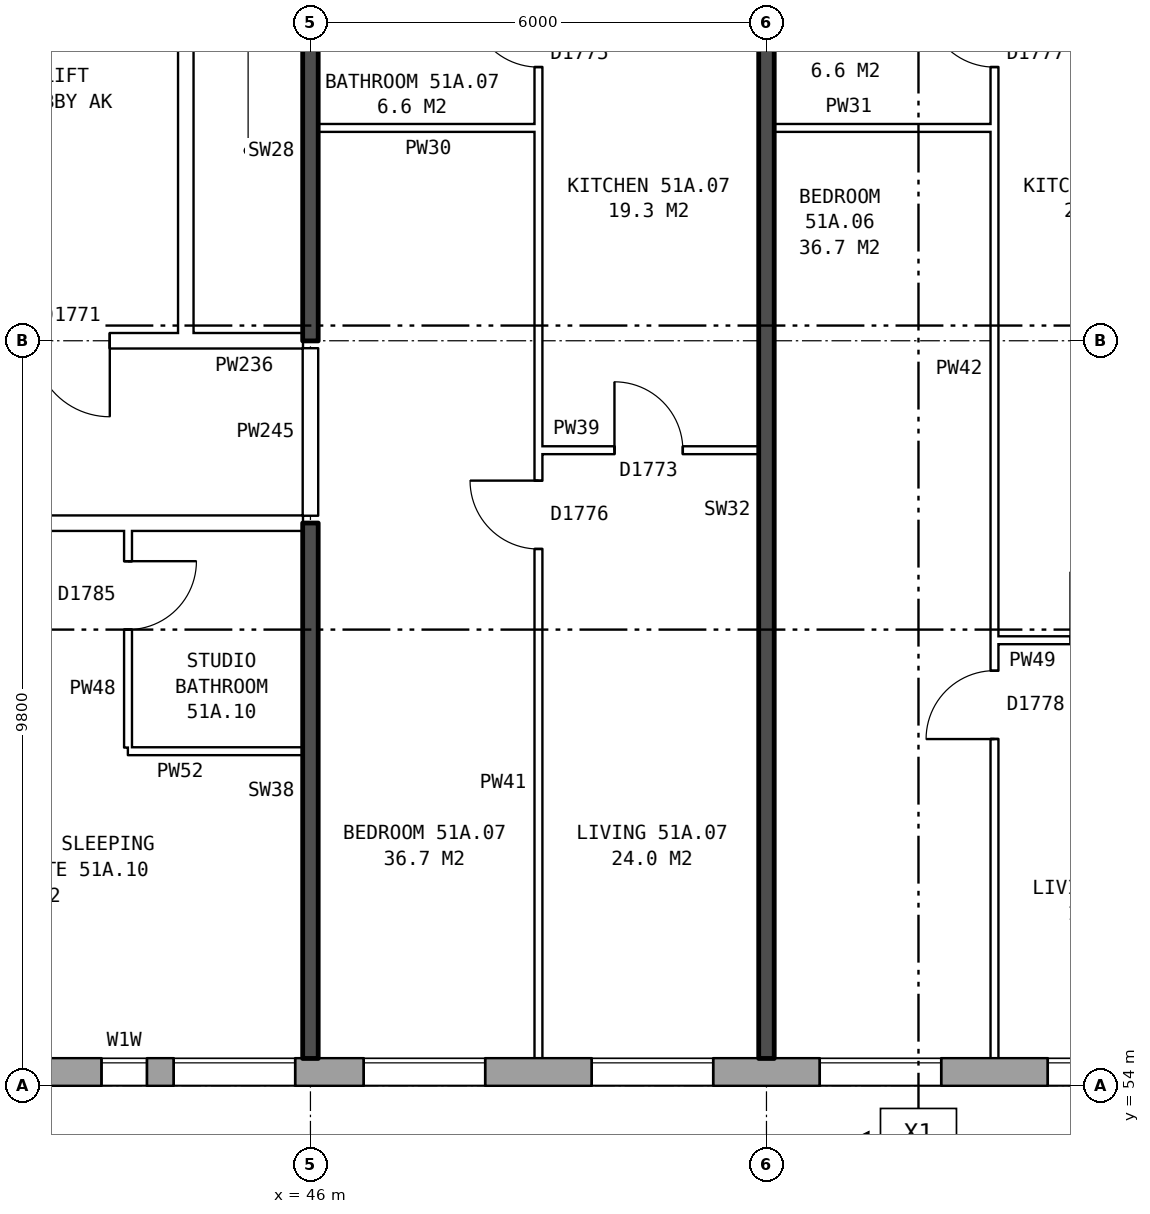
"""IFC4 building model, lengths in metres.
Left out: names, types, materials, properties, quantities, classifications, styles, units other than length and angle.
Written with IfcOpenShell. Run it as: python <this file> out.ifc"""

import sys

from ifc_helpers import new_model, si_unit, direction, frame, frame_2d, origin, place, context, subcontext, project, spatial, rectangle, extrude, element, fill, save


model = new_model("IFC4")
c1 = context("Model", 3, precision=1e-05, world=origin(), true_north=direction((0.0, 1.0)))
c2 = subcontext(c1, "Body", "Model", "MODEL_VIEW")
j1 = project(units=[si_unit("LENGTHUNIT", "METRE"), si_unit("PLANEANGLEUNIT", "RADIAN")], contexts=[c1])
p1 = place(None, origin())
s1 = spatial("IfcSite", under=j1, at=p1, CompositionType="ELEMENT")
p2 = place(p1, origin())
s2 = spatial("IfcBuilding", under=s1, at=p2, CompositionType="ELEMENT")
p3 = place(p2, frame((0.0, 0.0, 182.0)))
s3 = spatial("IfcBuildingStorey", under=s2, at=p3, CompositionType="ELEMENT", Elevation=182.0)
p4 = place(p3, frame((33.325, 54.18, 0.0), z_axis=(0.0, 0.0, 1.0), x_axis=(1.0, 0.0, 0.0)))
e1 = element("IfcWall", 1, at=p4, inside=s3, PredefinedType="STANDARD", context=c2, shape_type="SweptSolid", body=[
    extrude(rectangle(XDim=39.601, YDim=0.36, at=frame_2d((19.8, 0.0))), origin(), (0.0, 0.0, 1.0), 2.85),
])
p5 = place(p4, frame((1.375, 0.0, 0.8)))
e2 = element("IfcOpeningElement", 2, at=p5, cuts=e1, PredefinedType="OPENING", context=c2, shape_type="SweptSolid", body=[
    extrude(rectangle(XDim=1.6, YDim=1.8, at=frame_2d((0.8, 0.9))), frame((0.0, 0.19, 0.0), z_axis=(0.0, -1.0, 0.0), x_axis=(1.0, 0.0, 0.0)), (0.0, 0.0, 1.0), 0.38),
])
p6 = place(p4, frame((4.375, 0.0, 0.8)))
e3 = element("IfcOpeningElement", 3, at=p6, cuts=e1, PredefinedType="OPENING", context=c2, shape_type="SweptSolid", body=[
    extrude(rectangle(XDim=1.6, YDim=1.8, at=frame_2d((0.8, 0.9))), frame((0.0, 0.19, 0.0), z_axis=(0.0, -1.0, 0.0), x_axis=(1.0, 0.0, 0.0)), (0.0, 0.0, 1.0), 0.38),
])
p7 = place(p4, frame((6.875, 0.0, 0.8)))
e4 = element("IfcOpeningElement", 4, at=p7, cuts=e1, PredefinedType="OPENING", context=c2, shape_type="SweptSolid", body=[
    extrude(rectangle(XDim=1.0, YDim=1.8, at=frame_2d((0.5, 0.9))), frame((0.0, 0.19, 0.0), z_axis=(0.0, -1.0, 0.0), x_axis=(1.0, 0.0, 0.0)), (0.0, 0.0, 1.0), 0.38),
])
p8 = place(p4, frame((8.175, 0.0, 1.7)))
e5 = element("IfcOpeningElement", 5, at=p8, cuts=e1, PredefinedType="OPENING", context=c2, shape_type="SweptSolid", body=[
    extrude(rectangle(XDim=0.6, YDim=0.9, at=frame_2d((0.3, 0.45))), frame((0.0, 0.19, 0.0), z_axis=(0.0, -1.0, 0.0), x_axis=(1.0, 0.0, 0.0)), (0.0, 0.0, 1.0), 0.38),
])
p9 = place(p4, frame((13.375, 0.0, 0.8)))
e6 = element("IfcOpeningElement", 6, at=p9, cuts=e1, PredefinedType="OPENING", context=c2, shape_type="SweptSolid", body=[
    extrude(rectangle(XDim=1.6, YDim=1.8, at=frame_2d((0.8, 0.9))), frame((0.0, 0.19, 0.0), z_axis=(0.0, -1.0, 0.0), x_axis=(1.0, 0.0, 0.0)), (0.0, 0.0, 1.0), 0.38),
])
p10 = place(p4, frame((16.375, 0.0, 0.8)))
e7 = element("IfcOpeningElement", 7, at=p10, cuts=e1, PredefinedType="OPENING", context=c2, shape_type="SweptSolid", body=[
    extrude(rectangle(XDim=1.6, YDim=1.8, at=frame_2d((0.8, 0.9))), frame((0.0, 0.19, 0.0), z_axis=(0.0, -1.0, 0.0), x_axis=(1.0, 0.0, 0.0)), (0.0, 0.0, 1.0), 0.38),
])
p11 = place(p4, frame((19.375, 0.0, 0.8)))
e8 = element("IfcOpeningElement", 8, at=p11, cuts=e1, PredefinedType="OPENING", context=c2, shape_type="SweptSolid", body=[
    extrude(rectangle(XDim=1.6, YDim=1.8, at=frame_2d((0.8, 0.9))), frame((0.0, 0.19, 0.0), z_axis=(0.0, -1.0, 0.0), x_axis=(1.0, 0.0, 0.0)), (0.0, 0.0, 1.0), 0.38),
])
p12 = place(p4, frame((22.375, 0.0, 0.8)))
e9 = element("IfcOpeningElement", 9, at=p12, cuts=e1, PredefinedType="OPENING", context=c2, shape_type="SweptSolid", body=[
    extrude(rectangle(XDim=1.6, YDim=1.8, at=frame_2d((0.8, 0.9))), frame((0.0, 0.19, 0.0), z_axis=(0.0, -1.0, 0.0), x_axis=(1.0, 0.0, 0.0)), (0.0, 0.0, 1.0), 0.38),
])
p13 = place(p4, frame((25.375, 0.0, 0.8)))
e10 = element("IfcOpeningElement", 10, at=p13, cuts=e1, PredefinedType="OPENING", context=c2, shape_type="SweptSolid", body=[
    extrude(rectangle(XDim=1.6, YDim=1.8, at=frame_2d((0.8, 0.9))), frame((0.0, 0.19, 0.0), z_axis=(0.0, -1.0, 0.0), x_axis=(1.0, 0.0, 0.0)), (0.0, 0.0, 1.0), 0.38),
])
p14 = place(p4, frame((27.825, 0.0, 0.35)))
e11 = element("IfcOpeningElement", 11, at=p14, cuts=e1, PredefinedType="OPENING", context=c2, shape_type="SweptSolid", body=[
    extrude(rectangle(XDim=1.4, YDim=1.8, at=frame_2d((0.7, 0.9))), frame((0.0, 0.19, 0.0), z_axis=(0.0, -1.0, 0.0), x_axis=(1.0, 0.0, 0.0)), (0.0, 0.0, 1.0), 0.38),
])
p15 = place(p4, frame((31.375, 0.0, 0.8)))
e12 = element("IfcOpeningElement", 12, at=p15, cuts=e1, PredefinedType="OPENING", context=c2, shape_type="SweptSolid", body=[
    extrude(rectangle(XDim=1.6, YDim=1.8, at=frame_2d((0.8, 0.9))), frame((0.0, 0.19, 0.0), z_axis=(0.0, -1.0, 0.0), x_axis=(1.0, 0.0, 0.0)), (0.0, 0.0, 1.0), 0.38),
])
p16 = place(p4, frame((34.375, 0.0, 0.8)))
e13 = element("IfcOpeningElement", 13, at=p16, cuts=e1, PredefinedType="OPENING", context=c2, shape_type="SweptSolid", body=[
    extrude(rectangle(XDim=1.6, YDim=1.8, at=frame_2d((0.8, 0.9))), frame((0.0, 0.19, 0.0), z_axis=(0.0, -1.0, 0.0), x_axis=(1.0, 0.0, 0.0)), (0.0, 0.0, 1.0), 0.38),
])
p17 = place(p4, frame((37.375, 0.0, 0.8)))
e14 = element("IfcOpeningElement", 14, at=p17, cuts=e1, PredefinedType="OPENING", context=c2, shape_type="SweptSolid", body=[
    extrude(rectangle(XDim=1.6, YDim=1.8, at=frame_2d((0.8, 0.9))), frame((0.0, 0.19, 0.0), z_axis=(0.0, -1.0, 0.0), x_axis=(1.0, 0.0, 0.0)), (0.0, 0.0, 1.0), 0.38),
])
p18 = place(p4, frame((9.925, 0.0, 0.8)))
e15 = element("IfcOpeningElement", 15, at=p18, cuts=e1, PredefinedType="OPENING", context=c2, shape_type="SweptSolid", body=[
    extrude(rectangle(XDim=0.6, YDim=0.9, at=frame_2d((0.3, 0.45))), frame((0.0, 0.19, 0.0), z_axis=(0.0, -1.0, 0.0), x_axis=(1.0, 0.0, 0.0)), (0.0, 0.0, 1.0), 0.38),
])
p19 = place(p4, frame((10.875, 0.0, 0.8)))
e16 = element("IfcOpeningElement", 16, at=p19, cuts=e1, PredefinedType="OPENING", context=c2, shape_type="SweptSolid", body=[
    extrude(rectangle(XDim=1.6, YDim=1.8, at=frame_2d((0.8, 0.9))), frame((0.0, 0.19, 0.0), z_axis=(0.0, -1.0, 0.0), x_axis=(1.0, 0.0, 0.0)), (0.0, 0.0, 1.0), 0.38),
])
p20 = place(p4, frame((29.525, 0.0, 0.35)))
e17 = element("IfcOpeningElement", 17, at=p20, cuts=e1, PredefinedType="OPENING", context=c2, shape_type="SweptSolid", body=[
    extrude(rectangle(XDim=0.6, YDim=0.9, at=frame_2d((0.3, 0.45))), frame((0.0, 0.19, 0.0), z_axis=(0.0, -1.0, 0.0), x_axis=(1.0, 0.0, 0.0)), (0.0, 0.0, 1.0), 0.38),
])
p21 = place(p3, frame((44.36, 63.9, 0.0), z_axis=(0.0, 0.0, 1.0), x_axis=(0.0, 1.0, 0.0)))
e18 = element("IfcWall", 18, at=p21, inside=s3, PredefinedType="PARTITIONING", context=c2, shape_type="SweptSolid", body=[
    extrude(rectangle(XDim=12.2, YDim=0.2, at=frame_2d((6.1, 0.0))), origin(), (0.0, 0.0, 1.0), 2.85),
])
p22 = place(p21, frame((5.1, 0.0, 0.0)))
e19 = element("IfcOpeningElement", 19, at=p22, cuts=e18, PredefinedType="OPENING", context=c2, shape_type="SweptSolid", body=[
    extrude(rectangle(XDim=2.0, YDim=2.1, at=frame_2d((1.0, 1.05))), frame((0.0, 0.11, 0.0), z_axis=(0.0, -1.0, 0.0), x_axis=(1.0, 0.0, 0.0)), (0.0, 0.0, 1.0), 0.22),
])
p23 = place(p3, frame((43.6, 58.4, 0.0), z_axis=(0.0, 0.0, 1.0), x_axis=(1.0, 0.0, 0.0)))
e20 = element("IfcWall", 20, at=p23, inside=s3, PredefinedType="PARTITIONING", context=c2, shape_type="SweptSolid", body=[
    extrude(rectangle(XDim=2.3, YDim=0.1, at=frame_2d((1.15, 0.0))), origin(), (0.0, 0.0, 1.0), 2.85),
])
p24 = place(p3, frame((55.0, 59.86, 0.0), z_axis=(0.0, 0.0, 1.0), x_axis=(1.0, 0.0, 0.0)))
e21 = element("IfcWall", 21, at=p24, inside=s3, PredefinedType="PARTITIONING", context=c2, shape_type="SweptSolid", body=[
    extrude(rectangle(XDim=2.9, YDim=0.1, at=frame_2d((1.45, 0.0))), origin(), (0.0, 0.0, 1.0), 2.85),
])
p25 = place(p24, frame((1.0, 0.0, 0.0)))
e22 = element("IfcOpeningElement", 22, at=p25, cuts=e21, PredefinedType="OPENING", context=c2, shape_type="SweptSolid", body=[
    extrude(rectangle(XDim=0.9, YDim=2.1, at=frame_2d((0.45, 1.05))), frame((0.0, 0.06, 0.0), z_axis=(0.0, -1.0, 0.0), x_axis=(1.0, 0.0, 0.0)), (0.0, 0.0, 1.0), 0.12),
])
p26 = place(p3, frame((30.61, 61.4, 0.0), z_axis=(0.0, 0.0, 1.0), x_axis=(1.0, 0.0, 0.0)))
e23 = element("IfcWall", 23, at=p26, inside=s3, PredefinedType="PARTITIONING", context=c2, shape_type="SweptSolid", body=[
    extrude(rectangle(XDim=15.29, YDim=0.2, at=frame_2d((7.645, 0.0))), origin(), (0.0, 0.0, 1.0), 2.85),
])
p27 = place(p26, frame((10.69, 0.0, 0.0)))
e24 = element("IfcOpeningElement", 24, at=p27, cuts=e23, PredefinedType="OPENING", context=c2, shape_type="SweptSolid", body=[
    extrude(rectangle(XDim=1.0, YDim=2.1, at=frame_2d((0.5, 1.05))), frame((0.0, 0.11, 0.0), z_axis=(0.0, -1.0, 0.0), x_axis=(1.0, 0.0, 0.0)), (0.0, 0.0, 1.0), 0.22),
])
p28 = place(p26, frame((5.89, 0.0, 0.0)))
e25 = element("IfcOpeningElement", 25, at=p28, cuts=e23, PredefinedType="OPENING", context=c2, shape_type="SweptSolid", body=[
    extrude(rectangle(XDim=1.0, YDim=2.1, at=frame_2d((0.5, 1.05))), frame((0.0, 0.11, 0.0), z_axis=(0.0, -1.0, 0.0), x_axis=(1.0, 0.0, 0.0)), (0.0, 0.0, 1.0), 0.22),
])
p29 = place(p3, frame((49.0, 62.36, 0.0), z_axis=(0.0, 0.0, 1.0), x_axis=(1.0, 0.0, 0.0)))
e26 = element("IfcWall", 26, at=p29, inside=s3, PredefinedType="PARTITIONING", context=c2, shape_type="SweptSolid", body=[
    extrude(rectangle(XDim=2.9, YDim=0.1, at=frame_2d((1.45, 0.0))), origin(), (0.0, 0.0, 1.0), 2.85),
])
p30 = place(p29, frame((1.0, 0.0, 0.0)))
e27 = element("IfcOpeningElement", 27, at=p30, cuts=e26, PredefinedType="OPENING", context=c2, shape_type="SweptSolid", body=[
    extrude(rectangle(XDim=0.9, YDim=2.1, at=frame_2d((0.45, 1.05))), frame((0.0, 0.06, 0.0), z_axis=(0.0, -1.0, 0.0), x_axis=(1.0, 0.0, 0.0)), (0.0, 0.0, 1.0), 0.12),
])
p31 = place(p3, frame((41.36, 63.8, 0.0), z_axis=(0.0, 0.0, 1.0), x_axis=(1.0, 0.0, 0.0)))
e28 = element("IfcWall", 28, at=p31, inside=s3, PredefinedType="PARTITIONING", context=c2, shape_type="SweptSolid", body=[
    extrude(rectangle(XDim=3.0, YDim=0.2, at=frame_2d((1.5, 0.0))), origin(), (0.0, 0.0, 1.0), 2.85),
])
p32 = place(p31, frame((1.0, 0.0, 0.0)))
e29 = element("IfcOpeningElement", 29, at=p32, cuts=e28, PredefinedType="OPENING", context=c2, shape_type="SweptSolid", body=[
    extrude(rectangle(XDim=1.0, YDim=2.1, at=frame_2d((0.5, 1.05))), frame((0.0, 0.11, 0.0), z_axis=(0.0, -1.0, 0.0), x_axis=(1.0, 0.0, 0.0)), (0.0, 0.0, 1.0), 0.22),
])
p33 = place(p3, frame((44.36, 63.8, 0.0), z_axis=(0.0, 0.0, 1.0), x_axis=(1.0, 0.0, 0.0)))
e30 = element("IfcWall", 30, at=p33, inside=s3, PredefinedType="PARTITIONING", context=c2, shape_type="SweptSolid", body=[
    extrude(rectangle(XDim=1.54, YDim=0.2, at=frame_2d((0.77, 0.0))), origin(), (0.0, 0.0, 1.0), 2.85),
])
for number, where, z_axis, x_axis in (
    (31, (46.1, 66.6, 0.0), (0.0, 0.0, 1.0), (1.0, 0.0, 0.0)),
    (32, (52.1, 66.6, 0.0), (0.0, 0.0, 1.0), (1.0, 0.0, 0.0)),
):
    element("IfcWall", number, at=place(p3, frame(where, z_axis=z_axis, x_axis=x_axis)), inside=s3, PredefinedType="PARTITIONING", context=c2, shape_type="SweptSolid", body=[
        extrude(rectangle(XDim=2.9, YDim=0.1, at=frame_2d((1.45, 0.0))), origin(), (0.0, 0.0, 1.0), 2.85),
    ])
p34 = place(p3, frame((43.6, 58.45, 0.0), z_axis=(0.0, 0.0, 1.0), x_axis=(0.0, 1.0, 0.0)))
e33 = element("IfcWall", 33, at=p34, inside=s3, PredefinedType="PARTITIONING", context=c2, shape_type="SweptSolid", body=[
    extrude(rectangle(XDim=2.85, YDim=0.1, at=frame_2d((1.425, 0.0))), origin(), (0.0, 0.0, 1.0), 2.85),
])
p35 = place(p34, frame((1.55, 0.0, 0.0)))
e34 = element("IfcOpeningElement", 34, at=p35, cuts=e33, PredefinedType="OPENING", context=c2, shape_type="SweptSolid", body=[
    extrude(rectangle(XDim=0.9, YDim=2.1, at=frame_2d((0.45, 1.05))), frame((0.0, 0.06, 0.0), z_axis=(0.0, -1.0, 0.0), x_axis=(1.0, 0.0, 0.0)), (0.0, 0.0, 1.0), 0.12),
])
p36 = place(p3, frame((46.0, 54.36, 0.0), z_axis=(0.0, 0.0, 1.0), x_axis=(0.0, 1.0, 0.0)))
e35 = element("IfcWall", 35, at=p36, inside=s3, PredefinedType="SOLIDWALL", context=c2, shape_type="SweptSolid", body=[
    extrude(rectangle(XDim=7.04, YDim=0.2, at=frame_2d((3.52, 0.0))), origin(), (0.0, 0.0, 1.0), 2.85),
])
p37 = place(p3, frame((46.0, 61.5, 0.0), z_axis=(0.0, 0.0, 1.0), x_axis=(0.0, 1.0, 0.0)))
e36 = element("IfcWall", 36, at=p37, inside=s3, PredefinedType="PARTITIONING", context=c2, shape_type="SweptSolid", body=[
    extrude(rectangle(XDim=2.2, YDim=0.2, at=frame_2d((1.1, 0.0))), origin(), (0.0, 0.0, 1.0), 2.85),
])
p38 = place(p3, frame((46.0, 63.8, 0.0), z_axis=(0.0, 0.0, 1.0), x_axis=(0.0, 1.0, 0.0)))
e37 = element("IfcWall", 37, at=p38, inside=s3, PredefinedType="SOLIDWALL", context=c2, shape_type="SweptSolid", body=[
    extrude(rectangle(XDim=5.0, YDim=0.2, at=frame_2d((2.5, 0.0))), origin(), (0.0, 0.0, 1.0), 2.85),
])
p39 = place(p3, frame((49.0, 54.36, 0.0), z_axis=(0.0, 0.0, 1.0), x_axis=(0.0, 1.0, 0.0)))
e38 = element("IfcWall", 38, at=p39, inside=s3, PredefinedType="PARTITIONING", context=c2, shape_type="SweptSolid", body=[
    extrude(rectangle(XDim=14.34, YDim=0.1, at=frame_2d((7.17, 0.0))), origin(), (0.0, 0.0, 1.0), 2.85),
])
p40 = place(p39, frame((6.7, 0.0, 0.0)))
e39 = element("IfcOpeningElement", 39, at=p40, cuts=e38, PredefinedType="OPENING", context=c2, shape_type="SweptSolid", body=[
    extrude(rectangle(XDim=0.9, YDim=2.1, at=frame_2d((0.45, 1.05))), frame((0.0, 0.06, 0.0), z_axis=(0.0, -1.0, 0.0), x_axis=(1.0, 0.0, 0.0)), (0.0, 0.0, 1.0), 0.12),
])
p41 = place(p39, frame((13.04, 0.0, 0.0)))
e40 = element("IfcOpeningElement", 40, at=p41, cuts=e38, PredefinedType="OPENING", context=c2, shape_type="SweptSolid", body=[
    extrude(rectangle(XDim=0.9, YDim=2.1, at=frame_2d((0.45, 1.05))), frame((0.0, 0.06, 0.0), z_axis=(0.0, -1.0, 0.0), x_axis=(1.0, 0.0, 0.0)), (0.0, 0.0, 1.0), 0.12),
])
p42 = place(p3, frame((52.0, 54.36, 0.0), z_axis=(0.0, 0.0, 1.0), x_axis=(0.0, 1.0, 0.0)))
e41 = element("IfcWall", 41, at=p42, inside=s3, PredefinedType="SOLIDWALL", context=c2, shape_type="SweptSolid", body=[
    extrude(rectangle(XDim=14.44, YDim=0.2, at=frame_2d((7.22, 0.0))), origin(), (0.0, 0.0, 1.0), 2.85),
])
p43 = place(p3, frame((55.0, 54.36, 0.0), z_axis=(0.0, 0.0, 1.0), x_axis=(0.0, 1.0, 0.0)))
e42 = element("IfcWall", 42, at=p43, inside=s3, PredefinedType="PARTITIONING", context=c2, shape_type="SweptSolid", body=[
    extrude(rectangle(XDim=14.34, YDim=0.1, at=frame_2d((7.17, 0.0))), origin(), (0.0, 0.0, 1.0), 2.85),
])
p44 = place(p43, frame((4.2, 0.0, 0.0)))
e43 = element("IfcOpeningElement", 43, at=p44, cuts=e42, PredefinedType="OPENING", context=c2, shape_type="SweptSolid", body=[
    extrude(rectangle(XDim=0.9, YDim=2.1, at=frame_2d((0.45, 1.05))), frame((0.0, 0.06, 0.0), z_axis=(0.0, -1.0, 0.0), x_axis=(1.0, 0.0, 0.0)), (0.0, 0.0, 1.0), 0.12),
])
p45 = place(p43, frame((13.04, 0.0, 0.0)))
e44 = element("IfcOpeningElement", 44, at=p45, cuts=e42, PredefinedType="OPENING", context=c2, shape_type="SweptSolid", body=[
    extrude(rectangle(XDim=0.9, YDim=2.1, at=frame_2d((0.45, 1.05))), frame((0.0, 0.06, 0.0), z_axis=(0.0, -1.0, 0.0), x_axis=(1.0, 0.0, 0.0)), (0.0, 0.0, 1.0), 0.12),
])
p46 = place(p9, origin())
e45 = element("IfcWindow", 45, at=p46, inside=s3, PartitioningType="SINGLE_PANEL", PredefinedType="WINDOW", context=c2, shape_type="SweptSolid", body=[
    extrude(rectangle(XDim=1.6, YDim=1.8, at=frame_2d((0.8, 0.9))), frame((0.0, 0.15, 0.0), z_axis=(0.0, -1.0, 0.0), x_axis=(1.0, 0.0, 0.0)), (0.0, 0.0, 1.0), 0.06),
])
fill(e6, e45)
p47 = place(p10, origin())
e46 = element("IfcWindow", 46, at=p47, inside=s3, PartitioningType="SINGLE_PANEL", PredefinedType="WINDOW", context=c2, shape_type="SweptSolid", body=[
    extrude(rectangle(XDim=1.6, YDim=1.8, at=frame_2d((0.8, 0.9))), frame((0.0, 0.15, 0.0), z_axis=(0.0, -1.0, 0.0), x_axis=(1.0, 0.0, 0.0)), (0.0, 0.0, 1.0), 0.06),
])
fill(e7, e46)
p48 = place(p11, origin())
e47 = element("IfcWindow", 47, at=p48, inside=s3, PartitioningType="SINGLE_PANEL", PredefinedType="WINDOW", context=c2, shape_type="SweptSolid", body=[
    extrude(rectangle(XDim=1.6, YDim=1.8, at=frame_2d((0.8, 0.9))), frame((0.0, 0.15, 0.0), z_axis=(0.0, -1.0, 0.0), x_axis=(1.0, 0.0, 0.0)), (0.0, 0.0, 1.0), 0.06),
])
fill(e8, e47)
p49 = place(p12, origin())
e48 = element("IfcWindow", 48, at=p49, inside=s3, PartitioningType="SINGLE_PANEL", PredefinedType="WINDOW", context=c2, shape_type="SweptSolid", body=[
    extrude(rectangle(XDim=1.6, YDim=1.8, at=frame_2d((0.8, 0.9))), frame((0.0, 0.15, 0.0), z_axis=(0.0, -1.0, 0.0), x_axis=(1.0, 0.0, 0.0)), (0.0, 0.0, 1.0), 0.06),
])
fill(e9, e48)
p50 = place(p32, frame((1.0, 0.0, 0.0), z_axis=(0.0, 0.0, 1.0), x_axis=(-1.0, 0.0, 0.0)))
e49 = element("IfcDoor", 49, at=p50, inside=s3, OperationType="SINGLE_SWING_LEFT", PredefinedType="DOOR", context=c2, shape_type="SweptSolid", body=[
    extrude(rectangle(XDim=1.0, YDim=2.1, at=frame_2d((0.5, 1.05))), frame((0.0, 0.025, 0.0), z_axis=(0.0, -1.0, 0.0), x_axis=(1.0, 0.0, 0.0)), (0.0, 0.0, 1.0), 0.05),
])
fill(e29, e49)
p51 = place(p44, origin())
e50 = element("IfcDoor", 50, at=p51, inside=s3, OperationType="SINGLE_SWING_LEFT", PredefinedType="DOOR", context=c2, shape_type="SweptSolid", body=[
    extrude(rectangle(XDim=0.9, YDim=2.1, at=frame_2d((0.45, 1.05))), frame((0.0, 0.025, 0.0), z_axis=(0.0, -1.0, 0.0), x_axis=(1.0, 0.0, 0.0)), (0.0, 0.0, 1.0), 0.05),
])
fill(e43, e50)
p52 = place(p45, origin())
e51 = element("IfcDoor", 51, at=p52, inside=s3, OperationType="SINGLE_SWING_RIGHT", PredefinedType="DOOR", context=c2, shape_type="SweptSolid", body=[
    extrude(rectangle(XDim=0.9, YDim=2.1, at=frame_2d((0.45, 1.05))), frame((0.0, 0.025, 0.0), z_axis=(0.0, -1.0, 0.0), x_axis=(1.0, 0.0, 0.0)), (0.0, 0.0, 1.0), 0.05),
])
fill(e44, e51)
p53 = place(p40, origin())
e52 = element("IfcDoor", 52, at=p53, inside=s3, OperationType="SINGLE_SWING_RIGHT", PredefinedType="DOOR", context=c2, shape_type="SweptSolid", body=[
    extrude(rectangle(XDim=0.9, YDim=2.1, at=frame_2d((0.45, 1.05))), frame((0.0, 0.025, 0.0), z_axis=(0.0, -1.0, 0.0), x_axis=(1.0, 0.0, 0.0)), (0.0, 0.0, 1.0), 0.05),
])
fill(e39, e52)
p54 = place(p30, origin())
e53 = element("IfcDoor", 53, at=p54, inside=s3, OperationType="SINGLE_SWING_LEFT", PredefinedType="DOOR", context=c2, shape_type="SweptSolid", body=[
    extrude(rectangle(XDim=0.9, YDim=2.1, at=frame_2d((0.45, 1.05))), frame((0.0, 0.025, 0.0), z_axis=(0.0, -1.0, 0.0), x_axis=(1.0, 0.0, 0.0)), (0.0, 0.0, 1.0), 0.05),
])
fill(e27, e53)
p55 = place(p41, origin())
e54 = element("IfcDoor", 54, at=p55, inside=s3, OperationType="SINGLE_SWING_RIGHT", PredefinedType="DOOR", context=c2, shape_type="SweptSolid", body=[
    extrude(rectangle(XDim=0.9, YDim=2.1, at=frame_2d((0.45, 1.05))), frame((0.0, 0.025, 0.0), z_axis=(0.0, -1.0, 0.0), x_axis=(1.0, 0.0, 0.0)), (0.0, 0.0, 1.0), 0.05),
])
fill(e40, e54)
p56 = place(p35, frame((0.9, 0.0, 0.0), z_axis=(0.0, 0.0, 1.0), x_axis=(-1.0, 0.0, 0.0)))
e55 = element("IfcDoor", 55, at=p56, inside=s3, OperationType="SINGLE_SWING_LEFT", PredefinedType="DOOR", context=c2, shape_type="SweptSolid", body=[
    extrude(rectangle(XDim=0.9, YDim=2.1, at=frame_2d((0.45, 1.05))), frame((0.0, 0.025, 0.0), z_axis=(0.0, -1.0, 0.0), x_axis=(1.0, 0.0, 0.0)), (0.0, 0.0, 1.0), 0.05),
])
fill(e34, e55)
p57 = place(p18, origin())
e56 = element("IfcWindow", 56, at=p57, inside=s3, PartitioningType="SINGLE_PANEL", PredefinedType="WINDOW", context=c2, shape_type="SweptSolid", body=[
    extrude(rectangle(XDim=0.6, YDim=0.9, at=frame_2d((0.3, 0.45))), frame((0.0, 0.15, 0.0), z_axis=(0.0, -1.0, 0.0), x_axis=(1.0, 0.0, 0.0)), (0.0, 0.0, 1.0), 0.06),
])
fill(e15, e56)
p58 = place(p19, origin())
e57 = element("IfcWindow", 57, at=p58, inside=s3, PartitioningType="SINGLE_PANEL", PredefinedType="WINDOW", context=c2, shape_type="SweptSolid", body=[
    extrude(rectangle(XDim=1.6, YDim=1.8, at=frame_2d((0.8, 0.9))), frame((0.0, 0.15, 0.0), z_axis=(0.0, -1.0, 0.0), x_axis=(1.0, 0.0, 0.0)), (0.0, 0.0, 1.0), 0.06),
])
fill(e16, e57)
save(model, sys.argv[1])
